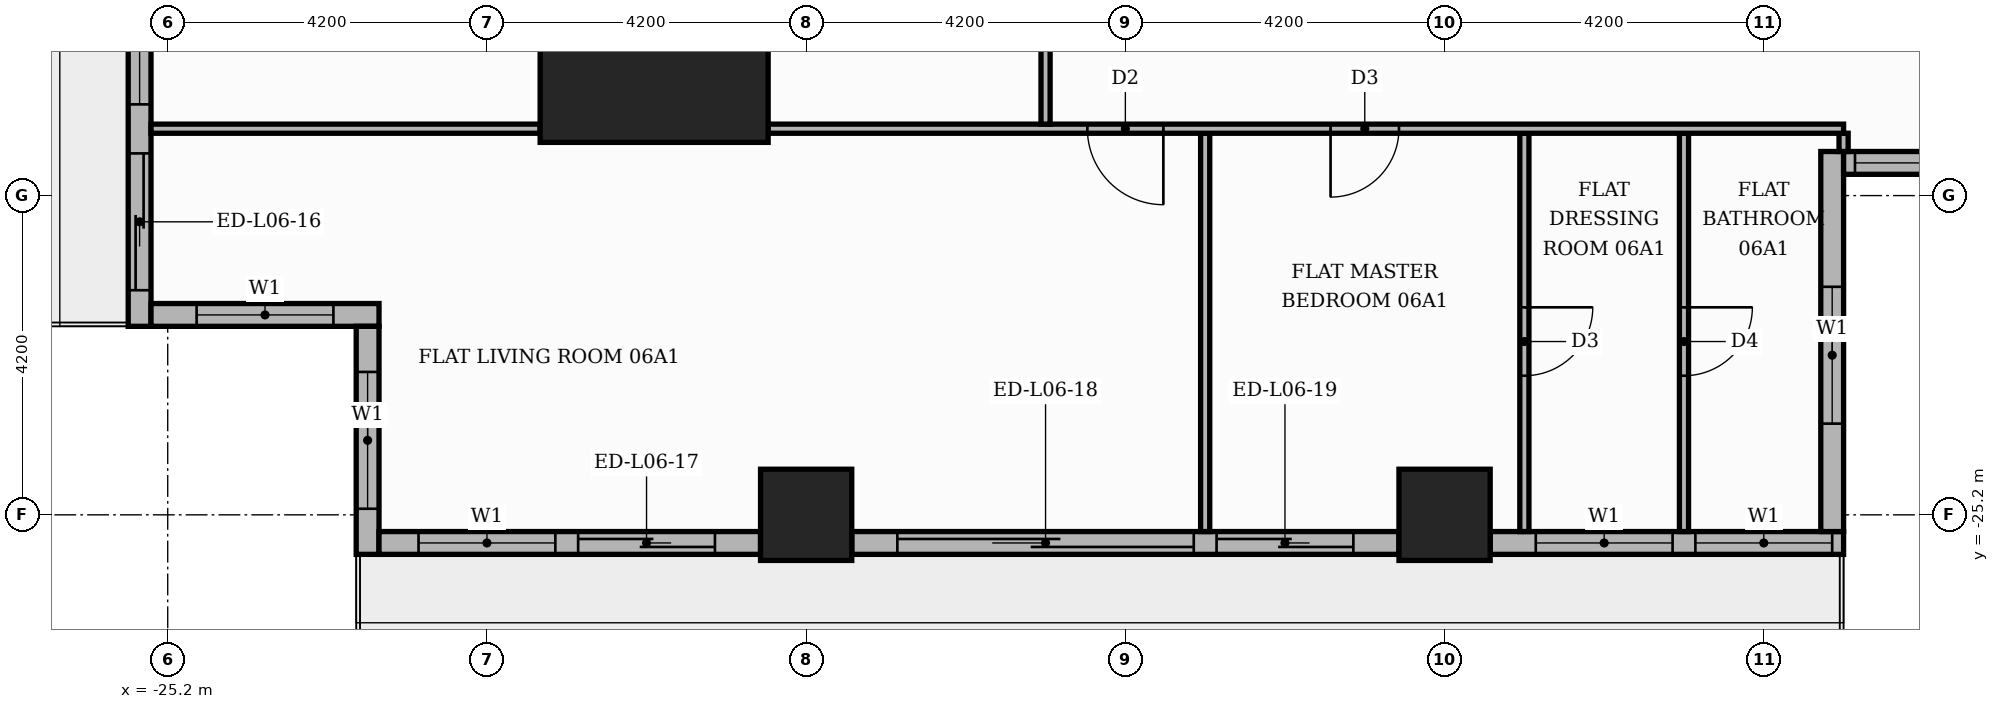
"""IFC4 building model, lengths in metres.
Left out: names, types, materials, properties, quantities, classifications, styles, units other than length and angle.
Written with IfcOpenShell. Run it as: python <this file> out.ifc"""

import sys

from ifc_helpers import new_model, si_unit, direction, frame, frame_2d, origin, origin_2d, place, context, subcontext, project, spatial, rectangle, extrude, element, fill, save


model = new_model("IFC4")
c1 = context("Model", 3, precision=1e-05, world=origin(), true_north=direction((0.0, 1.0)))
c2 = subcontext(c1, "Body", "Model", "MODEL_VIEW")
j1 = project(units=[si_unit("LENGTHUNIT", "METRE"), si_unit("PLANEANGLEUNIT", "RADIAN")], contexts=[c1])
p1 = place(None, origin())
s1 = spatial("IfcSite", under=j1, at=p1, CompositionType="ELEMENT")
p2 = place(p1, origin())
s2 = spatial("IfcBuilding", under=s1, at=p2, CompositionType="ELEMENT")
p3 = place(p2, frame((0.0, 0.0, 30.9)))
s3 = spatial("IfcBuildingStorey", under=s2, at=p3, CompositionType="ELEMENT", Elevation=30.9)
p4 = place(p3, frame((-18.8, -18.8, 0.0), z_axis=(0.0, 0.0, 1.0), x_axis=(1.0, 0.0, 0.0)))
e1 = element("IfcColumn", 1, at=p4, inside=s3, PredefinedType="COLUMN", context=c2, shape_type="SweptSolid", body=[
    extrude(rectangle(XDim=3.0, YDim=3.0, at=origin_2d()), origin(), (0.0, 0.0, 1.0), 3.9),
])
for number, where, z_axis, x_axis in (
    (2, (-8.4, -25.2, 0.0), (0.0, 0.0, 1.0), (1.0, 0.0, 0.0)),
    (3, (-16.8, -25.2, 0.0), (0.0, 0.0, 1.0), (1.0, 0.0, 0.0)),
):
    element("IfcColumn", number, at=place(p3, frame(where, z_axis=z_axis, x_axis=x_axis)), inside=s3, PredefinedType="COLUMN", context=c2, shape_type="SweptSolid", body=[
        extrude(rectangle(XDim=1.2, YDim=1.2, at=origin_2d()), origin(), (0.0, 0.0, 1.0), 3.9),
    ])
p5 = place(p3, frame((-25.57, -17.4, 0.0), z_axis=(0.0, 0.0, 1.0), x_axis=(0.0, -1.0, 0.0)))
e4 = element("IfcWall", 4, at=p5, inside=s3, PredefinedType="STANDARD", context=c2, shape_type="SweptSolid", body=[
    extrude(rectangle(XDim=5.32, YDim=0.3, at=frame_2d((2.66, 0.0))), origin(), (0.0, 0.0, 1.0), 3.48),
])
p6 = place(p5, frame((0.6, 0.0, 0.9)))
e5 = element("IfcOpeningElement", 5, at=p6, cuts=e4, PredefinedType="OPENING", context=c2, shape_type="SweptSolid", body=[
    extrude(rectangle(XDim=1.8, YDim=2.1, at=frame_2d((0.9, 1.05))), frame((0.0, 0.16, 0.0), z_axis=(0.0, -1.0, 0.0), x_axis=(1.0, 0.0, 0.0)), (0.0, 0.0, 1.0), 0.32),
])
p7 = place(p5, frame((3.045, 0.0, 0.0)))
e6 = element("IfcOpeningElement", 6, at=p7, cuts=e4, PredefinedType="OPENING", context=c2, shape_type="SweptSolid", body=[
    extrude(rectangle(XDim=1.8, YDim=2.4, at=frame_2d((0.9, 1.2))), frame((0.0, 0.16, 0.0), z_axis=(0.0, -1.0, 0.0), x_axis=(1.0, 0.0, 0.0)), (0.0, 0.0, 1.0), 0.32),
])
p8 = place(p3, frame((-25.42, -22.57, 0.0), z_axis=(0.0, 0.0, 1.0), x_axis=(1.0, 0.0, 0.0)))
e7 = element("IfcWall", 7, at=p8, inside=s3, PredefinedType="STANDARD", context=c2, shape_type="SweptSolid", body=[
    extrude(rectangle(XDim=3.0, YDim=0.3, at=frame_2d((1.5, 0.0))), origin(), (0.0, 0.0, 1.0), 3.48),
])
p9 = place(p8, frame((0.6, 0.0, 0.9)))
e8 = element("IfcOpeningElement", 8, at=p9, cuts=e7, PredefinedType="OPENING", context=c2, shape_type="SweptSolid", body=[
    extrude(rectangle(XDim=1.8, YDim=2.1, at=frame_2d((0.9, 1.05))), frame((0.0, 0.16, 0.0), z_axis=(0.0, -1.0, 0.0), x_axis=(1.0, 0.0, 0.0)), (0.0, 0.0, 1.0), 0.32),
])
p10 = place(p3, frame((-22.57, -22.72, 0.0), z_axis=(0.0, 0.0, 1.0), x_axis=(0.0, -1.0, 0.0)))
e9 = element("IfcWall", 9, at=p10, inside=s3, PredefinedType="STANDARD", context=c2, shape_type="SweptSolid", body=[
    extrude(rectangle(XDim=3.0, YDim=0.3, at=frame_2d((1.5, 0.0))), origin(), (0.0, 0.0, 1.0), 3.48),
])
p11 = place(p10, frame((0.6, 0.0, 0.9)))
e10 = element("IfcOpeningElement", 10, at=p11, cuts=e9, PredefinedType="OPENING", context=c2, shape_type="SweptSolid", body=[
    extrude(rectangle(XDim=1.8, YDim=2.1, at=frame_2d((0.9, 1.05))), frame((0.0, 0.16, 0.0), z_axis=(0.0, -1.0, 0.0), x_axis=(1.0, 0.0, 0.0)), (0.0, 0.0, 1.0), 0.32),
])
p12 = place(p3, frame((-22.42, -25.57, 0.0), z_axis=(0.0, 0.0, 1.0), x_axis=(1.0, 0.0, 0.0)))
e11 = element("IfcWall", 11, at=p12, inside=s3, PredefinedType="STANDARD", context=c2, shape_type="SweptSolid", body=[
    extrude(rectangle(XDim=5.02, YDim=0.3, at=frame_2d((2.51, 0.0))), origin(), (0.0, 0.0, 1.0), 3.48),
])
p13 = place(p12, frame((0.52, 0.0, 0.9)))
e12 = element("IfcOpeningElement", 12, at=p13, cuts=e11, PredefinedType="OPENING", context=c2, shape_type="SweptSolid", body=[
    extrude(rectangle(XDim=1.8, YDim=2.1, at=frame_2d((0.9, 1.05))), frame((0.0, 0.16, 0.0), z_axis=(0.0, -1.0, 0.0), x_axis=(1.0, 0.0, 0.0)), (0.0, 0.0, 1.0), 0.32),
])
p14 = place(p12, frame((2.62, 0.0, 0.0)))
e13 = element("IfcOpeningElement", 13, at=p14, cuts=e11, PredefinedType="OPENING", context=c2, shape_type="SweptSolid", body=[
    extrude(rectangle(XDim=1.8, YDim=2.4, at=frame_2d((0.9, 1.2))), frame((0.0, 0.16, 0.0), z_axis=(0.0, -1.0, 0.0), x_axis=(1.0, 0.0, 0.0)), (0.0, 0.0, 1.0), 0.32),
])
p15 = place(p3, frame((-16.2, -25.57, 0.0), z_axis=(0.0, 0.0, 1.0), x_axis=(1.0, 0.0, 0.0)))
e14 = element("IfcWall", 14, at=p15, inside=s3, PredefinedType="STANDARD", context=c2, shape_type="SweptSolid", body=[
    extrude(rectangle(XDim=7.2, YDim=0.3, at=frame_2d((3.6, 0.0))), origin(), (0.0, 0.0, 1.0), 3.48),
])
p16 = place(p15, frame((0.6, 0.0, 0.0)))
e15 = element("IfcOpeningElement", 15, at=p16, cuts=e14, PredefinedType="OPENING", context=c2, shape_type="SweptSolid", body=[
    extrude(rectangle(XDim=3.9, YDim=2.4, at=frame_2d((1.95, 1.2))), frame((0.0, 0.16, 0.0), z_axis=(0.0, -1.0, 0.0), x_axis=(1.0, 0.0, 0.0)), (0.0, 0.0, 1.0), 0.32),
])
p17 = place(p15, frame((4.8, 0.0, 0.0)))
e16 = element("IfcOpeningElement", 16, at=p17, cuts=e14, PredefinedType="OPENING", context=c2, shape_type="SweptSolid", body=[
    extrude(rectangle(XDim=1.8, YDim=2.4, at=frame_2d((0.9, 1.2))), frame((0.0, 0.16, 0.0), z_axis=(0.0, -1.0, 0.0), x_axis=(1.0, 0.0, 0.0)), (0.0, 0.0, 1.0), 0.32),
])
p18 = place(p3, frame((-7.8, -25.57, 0.0), z_axis=(0.0, 0.0, 1.0), x_axis=(1.0, 0.0, 0.0)))
e17 = element("IfcWall", 17, at=p18, inside=s3, PredefinedType="STANDARD", context=c2, shape_type="SweptSolid", body=[
    extrude(rectangle(XDim=4.65, YDim=0.3, at=frame_2d((2.325, 0.0))), origin(), (0.0, 0.0, 1.0), 3.48),
])
p19 = place(p18, frame((0.6, 0.0, 0.9)))
e18 = element("IfcOpeningElement", 18, at=p19, cuts=e17, PredefinedType="OPENING", context=c2, shape_type="SweptSolid", body=[
    extrude(rectangle(XDim=1.8, YDim=2.1, at=frame_2d((0.9, 1.05))), frame((0.0, 0.16, 0.0), z_axis=(0.0, -1.0, 0.0), x_axis=(1.0, 0.0, 0.0)), (0.0, 0.0, 1.0), 0.32),
])
p20 = place(p18, frame((2.7, 0.0, 0.9)))
e19 = element("IfcOpeningElement", 19, at=p20, cuts=e17, PredefinedType="OPENING", context=c2, shape_type="SweptSolid", body=[
    extrude(rectangle(XDim=1.8, YDim=2.1, at=frame_2d((0.9, 1.05))), frame((0.0, 0.16, 0.0), z_axis=(0.0, -1.0, 0.0), x_axis=(1.0, 0.0, 0.0)), (0.0, 0.0, 1.0), 0.32),
])
p21 = place(p3, frame((-3.3, -25.42, 0.0), z_axis=(0.0, 0.0, 1.0), x_axis=(0.0, 1.0, 0.0)))
e20 = element("IfcWall", 20, at=p21, inside=s3, PredefinedType="STANDARD", context=c2, shape_type="SweptSolid", body=[
    extrude(rectangle(XDim=5.0, YDim=0.3, at=frame_2d((2.5, 0.0))), origin(), (0.0, 0.0, 1.0), 3.48),
])
p22 = place(p21, frame((1.42, 0.0, 0.9)))
e21 = element("IfcOpeningElement", 21, at=p22, cuts=e20, PredefinedType="OPENING", context=c2, shape_type="SweptSolid", body=[
    extrude(rectangle(XDim=1.8, YDim=2.1, at=frame_2d((0.9, 1.05))), frame((0.0, 0.16, 0.0), z_axis=(0.0, -1.0, 0.0), x_axis=(1.0, 0.0, 0.0)), (0.0, 0.0, 1.0), 0.32),
])
p23 = place(p3, frame((-3.15, -20.57, 0.0), z_axis=(0.0, 0.0, 1.0), x_axis=(1.0, 0.0, 0.0)))
e22 = element("IfcWall", 22, at=p23, inside=s3, PredefinedType="STANDARD", context=c2, shape_type="SweptSolid", body=[
    extrude(rectangle(XDim=6.6, YDim=0.3, at=frame_2d((3.3, 0.0))), origin(), (0.0, 0.0, 1.0), 3.48),
])
p24 = place(p23, frame((0.15, 0.0, 0.9)))
e23 = element("IfcOpeningElement", 23, at=p24, cuts=e22, PredefinedType="OPENING", context=c2, shape_type="SweptSolid", body=[
    extrude(rectangle(XDim=6.0, YDim=2.1, at=frame_2d((3.0, 1.05))), frame((0.0, 0.16, 0.0), z_axis=(0.0, -1.0, 0.0), x_axis=(1.0, 0.0, 0.0)), (0.0, 0.0, 1.0), 0.32),
])
p25 = place(p3, frame((-11.55, -25.42, 0.0), z_axis=(0.0, 0.0, 1.0), x_axis=(0.0, 1.0, 0.0)))
e24 = element("IfcWall", 24, at=p25, inside=s3, PredefinedType="PARTITIONING", context=c2, shape_type="SweptSolid", body=[
    extrude(rectangle(XDim=5.24, YDim=0.12, at=frame_2d((2.62, 0.0))), origin(), (0.0, 0.0, 1.0), 3.48),
])
p26 = place(p3, frame((-7.35, -25.42, 0.0), z_axis=(0.0, 0.0, 1.0), x_axis=(0.0, 1.0, 0.0)))
e25 = element("IfcWall", 25, at=p26, inside=s3, PredefinedType="PARTITIONING", context=c2, shape_type="SweptSolid", body=[
    extrude(rectangle(XDim=5.24, YDim=0.12, at=frame_2d((2.62, 0.0))), origin(), (0.0, 0.0, 1.0), 3.48),
])
p27 = place(p26, frame((2.05, 0.0, 0.0)))
e26 = element("IfcOpeningElement", 26, at=p27, cuts=e25, PredefinedType="OPENING", context=c2, shape_type="SweptSolid", body=[
    extrude(rectangle(XDim=0.9, YDim=2.1, at=frame_2d((0.45, 1.05))), frame((0.0, 0.07, 0.0), z_axis=(0.0, -1.0, 0.0), x_axis=(1.0, 0.0, 0.0)), (0.0, 0.0, 1.0), 0.14),
])
p28 = place(p3, frame((-5.25, -25.42, 0.0), z_axis=(0.0, 0.0, 1.0), x_axis=(0.0, 1.0, 0.0)))
e27 = element("IfcWall", 27, at=p28, inside=s3, PredefinedType="PARTITIONING", context=c2, shape_type="SweptSolid", body=[
    extrude(rectangle(XDim=5.24, YDim=0.12, at=frame_2d((2.62, 0.0))), origin(), (0.0, 0.0, 1.0), 3.48),
])
p29 = place(p28, frame((2.05, 0.0, 0.0)))
e28 = element("IfcOpeningElement", 28, at=p29, cuts=e27, PredefinedType="OPENING", context=c2, shape_type="SweptSolid", body=[
    extrude(rectangle(XDim=0.9, YDim=2.1, at=frame_2d((0.45, 1.05))), frame((0.0, 0.07, 0.0), z_axis=(0.0, -1.0, 0.0), x_axis=(1.0, 0.0, 0.0)), (0.0, 0.0, 1.0), 0.14),
])
p30 = place(p3, frame((-3.15, -20.42, 0.0), z_axis=(0.0, 0.0, 1.0), x_axis=(0.0, 1.0, 0.0)))
e29 = element("IfcWall", 29, at=p30, inside=s3, PredefinedType="PARTITIONING", context=c2, shape_type="SweptSolid", body=[
    extrude(rectangle(XDim=0.24, YDim=0.12, at=frame_2d((0.12, 0.0))), origin(), (0.0, 0.0, 1.0), 3.48),
])
p31 = place(p3, frame((-25.42, -20.12, 0.0), z_axis=(0.0, 0.0, 1.0), x_axis=(1.0, 0.0, 0.0)))
e30 = element("IfcWall", 30, at=p31, inside=s3, PredefinedType="PARTITIONING", context=c2, shape_type="SweptSolid", body=[
    extrude(rectangle(XDim=5.12, YDim=0.12, at=frame_2d((2.56, 0.0))), origin(), (0.0, 0.0, 1.0), 3.48),
])
p32 = place(p3, frame((-17.3, -20.12, 0.0), z_axis=(0.0, 0.0, 1.0), x_axis=(1.0, 0.0, 0.0)))
e31 = element("IfcWall", 31, at=p32, inside=s3, PredefinedType="PARTITIONING", context=c2, shape_type="SweptSolid", body=[
    extrude(rectangle(XDim=14.15, YDim=0.12, at=frame_2d((7.075, 0.0))), origin(), (0.0, 0.0, 1.0), 3.48),
])
p33 = place(p32, frame((4.2, 0.0, 0.0)))
e32 = element("IfcOpeningElement", 32, at=p33, cuts=e31, PredefinedType="OPENING", context=c2, shape_type="SweptSolid", body=[
    extrude(rectangle(XDim=1.0, YDim=2.1, at=frame_2d((0.5, 1.05))), frame((0.0, 0.07, 0.0), z_axis=(0.0, -1.0, 0.0), x_axis=(1.0, 0.0, 0.0)), (0.0, 0.0, 1.0), 0.14),
])
p34 = place(p32, frame((7.4, 0.0, 0.0)))
e33 = element("IfcOpeningElement", 33, at=p34, cuts=e31, PredefinedType="OPENING", context=c2, shape_type="SweptSolid", body=[
    extrude(rectangle(XDim=0.9, YDim=2.1, at=frame_2d((0.45, 1.05))), frame((0.0, 0.07, 0.0), z_axis=(0.0, -1.0, 0.0), x_axis=(1.0, 0.0, 0.0)), (0.0, 0.0, 1.0), 0.14),
])
p35 = place(p3, frame((-13.65, -20.06, 0.0), z_axis=(0.0, 0.0, 1.0), x_axis=(0.0, 1.0, 0.0)))
e34 = element("IfcWall", 34, at=p35, inside=s3, PredefinedType="PARTITIONING", context=c2, shape_type="SweptSolid", body=[
    extrude(rectangle(XDim=6.31, YDim=0.12, at=frame_2d((3.155, 0.0))), origin(), (0.0, 0.0, 1.0), 3.48),
])
p36 = place(p35, frame((2.675, 0.0, 0.0)))
e35 = element("IfcOpeningElement", 35, at=p36, cuts=e34, PredefinedType="OPENING", context=c2, shape_type="SweptSolid", body=[
    extrude(rectangle(XDim=1.0, YDim=2.1, at=frame_2d((0.5, 1.05))), frame((0.0, 0.07, 0.0), z_axis=(0.0, -1.0, 0.0), x_axis=(1.0, 0.0, 0.0)), (0.0, 0.0, 1.0), 0.14),
])
p37 = place(p6, origin())
e36 = element("IfcWindow", 36, at=p37, inside=s3, PartitioningType="SINGLE_PANEL", PredefinedType="WINDOW", context=c2, shape_type="SweptSolid", body=[
    extrude(rectangle(XDim=1.8, YDim=2.1, at=frame_2d((0.9, 1.05))), frame((0.0, 0.03, 0.0), z_axis=(0.0, -1.0, 0.0), x_axis=(1.0, 0.0, 0.0)), (0.0, 0.0, 1.0), 0.06),
])
fill(e5, e36)
p38 = place(p7, origin())
e37 = element("IfcDoor", 37, at=p38, inside=s3, OperationType="SLIDING_TO_RIGHT", PredefinedType="DOOR", context=c2, shape_type="SweptSolid", body=[
    extrude(rectangle(XDim=1.8, YDim=2.4, at=frame_2d((0.9, 1.2))), frame((0.0, 0.025, 0.0), z_axis=(0.0, -1.0, 0.0), x_axis=(1.0, 0.0, 0.0)), (0.0, 0.0, 1.0), 0.05),
])
fill(e6, e37)
p39 = place(p9, origin())
e38 = element("IfcWindow", 38, at=p39, inside=s3, PartitioningType="SINGLE_PANEL", PredefinedType="WINDOW", context=c2, shape_type="SweptSolid", body=[
    extrude(rectangle(XDim=1.8, YDim=2.1, at=frame_2d((0.9, 1.05))), frame((0.0, 0.03, 0.0), z_axis=(0.0, -1.0, 0.0), x_axis=(1.0, 0.0, 0.0)), (0.0, 0.0, 1.0), 0.06),
])
fill(e8, e38)
p40 = place(p11, origin())
e39 = element("IfcWindow", 39, at=p40, inside=s3, PartitioningType="SINGLE_PANEL", PredefinedType="WINDOW", context=c2, shape_type="SweptSolid", body=[
    extrude(rectangle(XDim=1.8, YDim=2.1, at=frame_2d((0.9, 1.05))), frame((0.0, 0.03, 0.0), z_axis=(0.0, -1.0, 0.0), x_axis=(1.0, 0.0, 0.0)), (0.0, 0.0, 1.0), 0.06),
])
fill(e10, e39)
p41 = place(p13, origin())
e40 = element("IfcWindow", 40, at=p41, inside=s3, PartitioningType="SINGLE_PANEL", PredefinedType="WINDOW", context=c2, shape_type="SweptSolid", body=[
    extrude(rectangle(XDim=1.8, YDim=2.1, at=frame_2d((0.9, 1.05))), frame((0.0, 0.03, 0.0), z_axis=(0.0, -1.0, 0.0), x_axis=(1.0, 0.0, 0.0)), (0.0, 0.0, 1.0), 0.06),
])
fill(e12, e40)
p42 = place(p14, origin())
e41 = element("IfcDoor", 41, at=p42, inside=s3, OperationType="SLIDING_TO_RIGHT", PredefinedType="DOOR", context=c2, shape_type="SweptSolid", body=[
    extrude(rectangle(XDim=1.8, YDim=2.4, at=frame_2d((0.9, 1.2))), frame((0.0, 0.025, 0.0), z_axis=(0.0, -1.0, 0.0), x_axis=(1.0, 0.0, 0.0)), (0.0, 0.0, 1.0), 0.05),
])
fill(e13, e41)
p43 = place(p16, origin())
e42 = element("IfcDoor", 42, at=p43, inside=s3, OperationType="SLIDING_TO_LEFT", PredefinedType="DOOR", context=c2, shape_type="SweptSolid", body=[
    extrude(rectangle(XDim=3.9, YDim=2.4, at=frame_2d((1.95, 1.2))), frame((0.0, 0.025, 0.0), z_axis=(0.0, -1.0, 0.0), x_axis=(1.0, 0.0, 0.0)), (0.0, 0.0, 1.0), 0.05),
])
fill(e15, e42)
p44 = place(p17, origin())
e43 = element("IfcDoor", 43, at=p44, inside=s3, OperationType="SLIDING_TO_RIGHT", PredefinedType="DOOR", context=c2, shape_type="SweptSolid", body=[
    extrude(rectangle(XDim=1.8, YDim=2.4, at=frame_2d((0.9, 1.2))), frame((0.0, 0.025, 0.0), z_axis=(0.0, -1.0, 0.0), x_axis=(1.0, 0.0, 0.0)), (0.0, 0.0, 1.0), 0.05),
])
fill(e16, e43)
p45 = place(p19, origin())
e44 = element("IfcWindow", 44, at=p45, inside=s3, PartitioningType="SINGLE_PANEL", PredefinedType="WINDOW", context=c2, shape_type="SweptSolid", body=[
    extrude(rectangle(XDim=1.8, YDim=2.1, at=frame_2d((0.9, 1.05))), frame((0.0, 0.03, 0.0), z_axis=(0.0, -1.0, 0.0), x_axis=(1.0, 0.0, 0.0)), (0.0, 0.0, 1.0), 0.06),
])
fill(e18, e44)
p46 = place(p20, origin())
e45 = element("IfcWindow", 45, at=p46, inside=s3, PartitioningType="SINGLE_PANEL", PredefinedType="WINDOW", context=c2, shape_type="SweptSolid", body=[
    extrude(rectangle(XDim=1.8, YDim=2.1, at=frame_2d((0.9, 1.05))), frame((0.0, 0.03, 0.0), z_axis=(0.0, -1.0, 0.0), x_axis=(1.0, 0.0, 0.0)), (0.0, 0.0, 1.0), 0.06),
])
fill(e19, e45)
p47 = place(p22, origin())
e46 = element("IfcWindow", 46, at=p47, inside=s3, PartitioningType="SINGLE_PANEL", PredefinedType="WINDOW", context=c2, shape_type="SweptSolid", body=[
    extrude(rectangle(XDim=1.8, YDim=2.1, at=frame_2d((0.9, 1.05))), frame((0.0, 0.03, 0.0), z_axis=(0.0, -1.0, 0.0), x_axis=(1.0, 0.0, 0.0)), (0.0, 0.0, 1.0), 0.06),
])
fill(e21, e46)
p48 = place(p24, origin())
e47 = element("IfcWindow", 47, at=p48, inside=s3, PartitioningType="SINGLE_PANEL", PredefinedType="WINDOW", context=c2, shape_type="SweptSolid", body=[
    extrude(rectangle(XDim=6.0, YDim=2.1, at=frame_2d((3.0, 1.05))), frame((0.0, 0.03, 0.0), z_axis=(0.0, -1.0, 0.0), x_axis=(1.0, 0.0, 0.0)), (0.0, 0.0, 1.0), 0.06),
])
fill(e23, e47)
p49 = place(p33, frame((1.0, 0.0, 0.0), z_axis=(0.0, 0.0, 1.0), x_axis=(-1.0, 0.0, 0.0)))
e48 = element("IfcDoor", 48, at=p49, inside=s3, OperationType="SINGLE_SWING_RIGHT", PredefinedType="DOOR", context=c2, shape_type="SweptSolid", body=[
    extrude(rectangle(XDim=1.0, YDim=2.1, at=frame_2d((0.5, 1.05))), frame((0.0, 0.025, 0.0), z_axis=(0.0, -1.0, 0.0), x_axis=(1.0, 0.0, 0.0)), (0.0, 0.0, 1.0), 0.05),
])
fill(e32, e48)
p50 = place(p34, frame((0.9, 0.0, 0.0), z_axis=(0.0, 0.0, 1.0), x_axis=(-1.0, 0.0, 0.0)))
e49 = element("IfcDoor", 49, at=p50, inside=s3, OperationType="SINGLE_SWING_LEFT", PredefinedType="DOOR", context=c2, shape_type="SweptSolid", body=[
    extrude(rectangle(XDim=0.9, YDim=2.1, at=frame_2d((0.45, 1.05))), frame((0.0, 0.025, 0.0), z_axis=(0.0, -1.0, 0.0), x_axis=(1.0, 0.0, 0.0)), (0.0, 0.0, 1.0), 0.05),
])
fill(e33, e49)
p51 = place(p27, frame((0.9, 0.0, 0.0), z_axis=(0.0, 0.0, 1.0), x_axis=(-1.0, 0.0, 0.0)))
e50 = element("IfcDoor", 50, at=p51, inside=s3, OperationType="SINGLE_SWING_RIGHT", PredefinedType="DOOR", context=c2, shape_type="SweptSolid", body=[
    extrude(rectangle(XDim=0.9, YDim=2.1, at=frame_2d((0.45, 1.05))), frame((0.0, 0.025, 0.0), z_axis=(0.0, -1.0, 0.0), x_axis=(1.0, 0.0, 0.0)), (0.0, 0.0, 1.0), 0.05),
])
fill(e26, e50)
p52 = place(p29, frame((0.9, 0.0, 0.0), z_axis=(0.0, 0.0, 1.0), x_axis=(-1.0, 0.0, 0.0)))
e51 = element("IfcDoor", 51, at=p52, inside=s3, OperationType="SINGLE_SWING_RIGHT", PredefinedType="DOOR", context=c2, shape_type="SweptSolid", body=[
    extrude(rectangle(XDim=0.9, YDim=2.1, at=frame_2d((0.45, 1.05))), frame((0.0, 0.025, 0.0), z_axis=(0.0, -1.0, 0.0), x_axis=(1.0, 0.0, 0.0)), (0.0, 0.0, 1.0), 0.05),
])
fill(e28, e51)
save(model, sys.argv[1])
